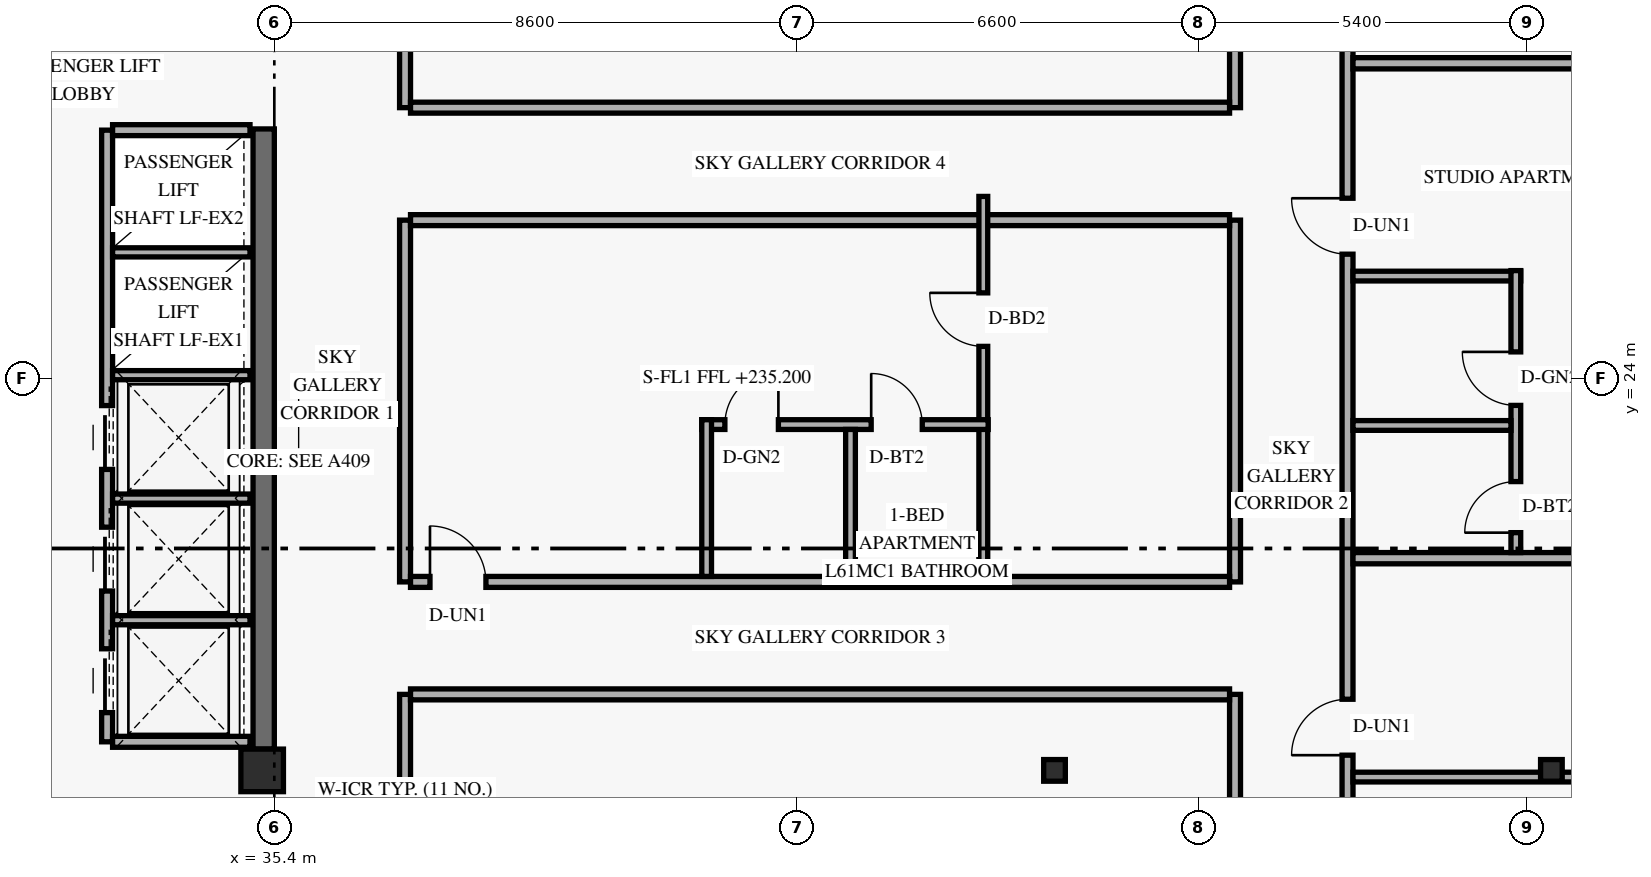
"""IFC4 building model, lengths in metres.
Left out: names, types, materials, properties, quantities, classifications, styles, units other than length and angle.
Written with IfcOpenShell. Run it as: python <this file> out.ifc"""

import sys

from ifc_helpers import new_model, si_unit, direction, frame, frame_2d, origin, origin_2d, place, context, subcontext, project, spatial, rectangle, hollow_rectangle, extrude, element, fill, save


model = new_model("IFC4")
c1 = context("Model", 3, precision=1e-05, world=origin(), true_north=direction((0.0, 1.0)))
c2 = subcontext(c1, "Body", "Model", "MODEL_VIEW")
j1 = project(units=[si_unit("LENGTHUNIT", "METRE"), si_unit("PLANEANGLEUNIT", "RADIAN")], contexts=[c1])
p1 = place(None, origin())
s1 = spatial("IfcSite", under=j1, at=p1, CompositionType="ELEMENT")
p2 = place(p1, origin())
s2 = spatial("IfcBuilding", under=s1, at=p2, CompositionType="ELEMENT")
p3 = place(p2, frame((0.0, 0.0, 235.2)))
s3 = spatial("IfcBuildingStorey", under=s2, at=p3, CompositionType="ELEMENT", Elevation=235.2)
p4 = place(p3, frame((35.225, 17.9, 0.0), z_axis=(0.0, 0.0, 1.0), x_axis=(0.0, 1.0, 0.0)))
e1 = element("IfcWall", 1, at=p4, inside=s3, PredefinedType="SHEAR", context=c2, shape_type="SweptSolid", body=[
    extrude(rectangle(XDim=10.2, YDim=0.35, at=frame_2d((5.1, 0.0))), origin(), (0.0, 0.0, 1.0), 2.821),
])
p5 = place(p3, frame((35.2, 17.55, 0.0), z_axis=(0.0, 0.0, 1.0), x_axis=(1.0, 0.0, 0.0)))
e2 = element("IfcColumn", 2, at=p5, inside=s3, PredefinedType="COLUMN", context=c2, shape_type="SweptSolid", body=[
    extrude(rectangle(XDim=0.7, YDim=0.7, at=origin_2d()), origin(), (0.0, 0.0, 1.0), 3.6),
])
p6 = place(p3, frame((48.168, 17.55, 0.0), z_axis=(0.034971136209, 0.0, 0.999388322742), x_axis=(0.0, 1.0, 0.0)))
e3 = element("IfcColumn", 3, at=p6, inside=s3, PredefinedType="COLUMN", context=c2, shape_type="SweptSolid", body=[
    extrude(hollow_rectangle(XDim=0.356, YDim=0.356, WallThickness=0.016, at=origin_2d()), origin(), (0.0, 0.0, 1.0), 3.602),
])
p7 = place(p3, frame((56.298, 17.55, 0.0), z_axis=(0.057884606321, 0.0, 0.998323280481), x_axis=(0.0, 1.0, 0.0)))
e4 = element("IfcColumn", 4, at=p7, inside=s3, PredefinedType="COLUMN", context=c2, shape_type="SweptSolid", body=[
    extrude(hollow_rectangle(XDim=0.356, YDim=0.356, WallThickness=0.016, at=origin_2d()), origin(), (0.0, 0.0, 1.0), 3.606),
])
p8 = place(p3, frame((32.65, 18.02, 0.0), z_axis=(0.0, 0.0, 1.0), x_axis=(0.0, 1.0, 0.0)))
e5 = element("IfcWall", 5, at=p8, inside=s3, PredefinedType="STANDARD", context=c2, shape_type="SweptSolid", body=[
    extrude(rectangle(XDim=10.06, YDim=0.18, at=frame_2d((5.03, 0.0))), origin(), (0.0, 0.0, 1.0), 3.36),
])
p9 = place(p8, frame((0.48, 0.0, 0.0)))
e6 = element("IfcOpeningElement", 6, at=p9, cuts=e5, PredefinedType="OPENING", context=c2, shape_type="SweptSolid", body=[
    extrude(rectangle(XDim=1.05, YDim=2.2, at=frame_2d((0.525, 1.1))), frame((0.0, 0.1, 0.0), z_axis=(0.0, -1.0, 0.0), x_axis=(1.0, 0.0, 0.0)), (0.0, 0.0, 1.0), 0.2),
])
p10 = place(p8, frame((2.48, 0.0, 0.0)))
e7 = element("IfcOpeningElement", 7, at=p10, cuts=e5, PredefinedType="OPENING", context=c2, shape_type="SweptSolid", body=[
    extrude(rectangle(XDim=1.05, YDim=2.2, at=frame_2d((0.525, 1.1))), frame((0.0, 0.1, 0.0), z_axis=(0.0, -1.0, 0.0), x_axis=(1.0, 0.0, 0.0)), (0.0, 0.0, 1.0), 0.2),
])
p11 = place(p8, frame((4.48, 0.0, 0.0)))
e8 = element("IfcOpeningElement", 8, at=p11, cuts=e5, PredefinedType="OPENING", context=c2, shape_type="SweptSolid", body=[
    extrude(rectangle(XDim=1.05, YDim=2.2, at=frame_2d((0.525, 1.1))), frame((0.0, 0.1, 0.0), z_axis=(0.0, -1.0, 0.0), x_axis=(1.0, 0.0, 0.0)), (0.0, 0.0, 1.0), 0.2),
])
for number, where, z_axis, x_axis in (
    (9, (32.74, 18.02, 0.0), (0.0, 0.0, 1.0), (1.0, 0.0, 0.0)),
    (10, (32.74, 28.08, 0.0), (0.0, 0.0, 1.0), (1.0, 0.0, 0.0)),
):
    element("IfcWall", number, at=place(p3, frame(where, z_axis=z_axis, x_axis=x_axis)), inside=s3, PredefinedType="STANDARD", context=c2, shape_type="SweptSolid", body=[
        extrude(rectangle(XDim=2.26, YDim=0.18, at=frame_2d((1.13, 0.0))), origin(), (0.0, 0.0, 1.0), 3.36),
    ])
for number, where, z_axis, x_axis in (
    (11, (32.74, 20.02, 0.0), (0.0, 0.0, 1.0), (1.0, 0.0, 0.0)),
    (12, (32.74, 22.02, 0.0), (0.0, 0.0, 1.0), (1.0, 0.0, 0.0)),
    (13, (32.74, 24.05, 0.0), (0.0, 0.0, 1.0), (1.0, 0.0, 0.0)),
    (14, (32.74, 26.07, 0.0), (0.0, 0.0, 1.0), (1.0, 0.0, 0.0)),
):
    element("IfcWall", number, at=place(p3, frame(where, z_axis=z_axis, x_axis=x_axis)), inside=s3, PredefinedType="STANDARD", context=c2, shape_type="SweptSolid", body=[
        extrude(rectangle(XDim=2.26, YDim=0.15, at=frame_2d((1.13, 0.0))), origin(), (0.0, 0.0, 1.0), 3.36),
    ])
p12 = place(p3, frame((37.55, 15.653, 0.0), z_axis=(0.0, 0.0, 1.0), x_axis=(0.0, 1.0, 0.0)))
e15 = element("IfcWall", 15, at=p12, inside=s3, PredefinedType="STANDARD", context=c2, shape_type="SweptSolid", body=[
    extrude(rectangle(XDim=3.147, YDim=0.18, at=frame_2d((1.574, 0.0))), origin(), (0.0, 0.0, 1.0), 2.803),
])
p13 = place(p3, frame((37.55, 20.65, 0.0), z_axis=(0.0, 0.0, 1.0), x_axis=(0.0, 1.0, 0.0)))
e16 = element("IfcWall", 16, at=p13, inside=s3, PredefinedType="STANDARD", context=c2, shape_type="SweptSolid", body=[
    extrude(rectangle(XDim=5.95, YDim=0.18, at=frame_2d((2.975, 0.0))), origin(), (0.0, 0.0, 1.0), 3.36),
])
p14 = place(p3, frame((37.55, 28.45, 0.0), z_axis=(0.0, 0.0, 1.0), x_axis=(0.0, 1.0, 0.0)))
e17 = element("IfcWall", 17, at=p14, inside=s3, PredefinedType="STANDARD", context=c2, shape_type="SweptSolid", body=[
    extrude(rectangle(XDim=2.828, YDim=0.18, at=frame_2d((1.414, 0.0))), origin(), (0.0, 0.0, 1.0), 2.803),
])
p15 = place(p3, frame((51.2, 5.77, 0.0), z_axis=(0.0, 0.0, 1.0), x_axis=(0.0, 1.0, 0.0)))
e18 = element("IfcWall", 18, at=p15, inside=s3, PredefinedType="STANDARD", context=c2, shape_type="SweptSolid", body=[
    extrude(rectangle(XDim=13.03, YDim=0.18, at=frame_2d((6.515, 0.0))), origin(), (0.0, 0.0, 1.0), 2.803),
])
p16 = place(p15, frame((3.87, 0.0, 0.0)))
e19 = element("IfcOpeningElement", 19, at=p16, cuts=e18, PredefinedType="OPENING", context=c2, shape_type="SweptSolid", body=[
    extrude(rectangle(XDim=0.92, YDim=2.15, at=frame_2d((0.46, 1.075))), frame((0.0, 0.1, 0.0), z_axis=(0.0, -1.0, 0.0), x_axis=(1.0, 0.0, 0.0)), (0.0, 0.0, 1.0), 0.2),
])
p17 = place(p3, frame((51.2, 20.65, 0.0), z_axis=(0.0, 0.0, 1.0), x_axis=(0.0, 1.0, 0.0)))
e20 = element("IfcWall", 20, at=p17, inside=s3, PredefinedType="STANDARD", context=c2, shape_type="SweptSolid", body=[
    extrude(rectangle(XDim=5.95, YDim=0.18, at=frame_2d((2.975, 0.0))), origin(), (0.0, 0.0, 1.0), 3.36),
])
p18 = place(p3, frame((51.2, 28.45, 0.0), z_axis=(0.0, 0.0, 1.0), x_axis=(0.0, 1.0, 0.0)))
e21 = element("IfcWall", 21, at=p18, inside=s3, PredefinedType="STANDARD", context=c2, shape_type="SweptSolid", body=[
    extrude(rectangle(XDim=13.78, YDim=0.18, at=frame_2d((6.89, 0.0))), origin(), (0.0, 0.0, 1.0), 2.803),
])
p19 = place(p18, frame((7.9, 0.0, 0.0)))
e22 = element("IfcOpeningElement", 22, at=p19, cuts=e21, PredefinedType="OPENING", context=c2, shape_type="SweptSolid", body=[
    extrude(rectangle(XDim=0.92, YDim=2.15, at=frame_2d((0.46, 1.075))), frame((0.0, 0.1, 0.0), z_axis=(0.0, -1.0, 0.0), x_axis=(1.0, 0.0, 0.0)), (0.0, 0.0, 1.0), 0.2),
])
p20 = place(p3, frame((37.64, 18.8, 0.0), z_axis=(0.0, 0.0, 1.0), x_axis=(1.0, 0.0, 0.0)))
e23 = element("IfcWall", 23, at=p20, inside=s3, PredefinedType="STANDARD", context=c2, shape_type="SweptSolid", body=[
    extrude(rectangle(XDim=13.47, YDim=0.18, at=frame_2d((6.735, 0.0))), origin(), (0.0, 0.0, 1.0), 2.803),
])
p21 = place(p3, frame((37.64, 20.65, 0.0), z_axis=(0.0, 0.0, 1.0), x_axis=(1.0, 0.0, 0.0)))
e24 = element("IfcWall", 24, at=p21, inside=s3, PredefinedType="STANDARD", context=c2, shape_type="SweptSolid", body=[
    extrude(rectangle(XDim=13.47, YDim=0.18, at=frame_2d((6.735, 0.0))), origin(), (0.0, 0.0, 1.0), 2.803),
])
p22 = place(p21, frame((0.32, 0.0, 0.0)))
e25 = element("IfcOpeningElement", 25, at=p22, cuts=e24, PredefinedType="OPENING", context=c2, shape_type="SweptSolid", body=[
    extrude(rectangle(XDim=0.92, YDim=2.15, at=frame_2d((0.46, 1.075))), frame((0.0, 0.1, 0.0), z_axis=(0.0, -1.0, 0.0), x_axis=(1.0, 0.0, 0.0)), (0.0, 0.0, 1.0), 0.2),
])
for number, where, z_axis, x_axis in (
    (26, (37.64, 26.6, 0.0), (0.0, 0.0, 1.0), (1.0, 0.0, 0.0)),
    (27, (37.64, 28.45, 0.0), (0.0, 0.0, 1.0), (1.0, 0.0, 0.0)),
):
    element("IfcWall", number, at=place(p3, frame(where, z_axis=z_axis, x_axis=x_axis)), inside=s3, PredefinedType="STANDARD", context=c2, shape_type="SweptSolid", body=[
        extrude(rectangle(XDim=13.47, YDim=0.18, at=frame_2d((6.735, 0.0))), origin(), (0.0, 0.0, 1.0), 2.803),
    ])
p23 = place(p3, frame((53.05, 5.77, 0.0), z_axis=(0.0, 0.0, 1.0), x_axis=(0.0, 1.0, 0.0)))
e28 = element("IfcWall", 28, at=p23, inside=s3, PredefinedType="STANDARD", context=c2, shape_type="SweptSolid", body=[
    extrude(rectangle(XDim=36.46, YDim=0.18, at=frame_2d((18.23, 0.0))), origin(), (0.0, 0.0, 1.0), 2.803),
])
p24 = place(p23, frame((1.357, 0.0, 0.0)))
e29 = element("IfcOpeningElement", 29, at=p24, cuts=e28, PredefinedType="OPENING", context=c2, shape_type="SweptSolid", body=[
    extrude(rectangle(XDim=0.92, YDim=2.15, at=frame_2d((0.46, 1.075))), frame((0.0, 0.1, 0.0), z_axis=(0.0, -1.0, 0.0), x_axis=(1.0, 0.0, 0.0)), (0.0, 0.0, 1.0), 0.2),
])
p25 = place(p23, frame((12.03, 0.0, 0.0)))
e30 = element("IfcOpeningElement", 30, at=p25, cuts=e28, PredefinedType="OPENING", context=c2, shape_type="SweptSolid", body=[
    extrude(rectangle(XDim=0.92, YDim=2.15, at=frame_2d((0.46, 1.075))), frame((0.0, 0.1, 0.0), z_axis=(0.0, -1.0, 0.0), x_axis=(1.0, 0.0, 0.0)), (0.0, 0.0, 1.0), 0.2),
])
p26 = place(p23, frame((20.27, 0.0, 0.0)))
e31 = element("IfcOpeningElement", 31, at=p26, cuts=e28, PredefinedType="OPENING", context=c2, shape_type="SweptSolid", body=[
    extrude(rectangle(XDim=0.92, YDim=2.15, at=frame_2d((0.46, 1.075))), frame((0.0, 0.1, 0.0), z_axis=(0.0, -1.0, 0.0), x_axis=(1.0, 0.0, 0.0)), (0.0, 0.0, 1.0), 0.2),
])
p27 = place(p23, frame((28.21, 0.0, 0.0)))
e32 = element("IfcOpeningElement", 32, at=p27, cuts=e28, PredefinedType="OPENING", context=c2, shape_type="SweptSolid", body=[
    extrude(rectangle(XDim=0.92, YDim=2.15, at=frame_2d((0.46, 1.075))), frame((0.0, 0.1, 0.0), z_axis=(0.0, -1.0, 0.0), x_axis=(1.0, 0.0, 0.0)), (0.0, 0.0, 1.0), 0.2),
])
p28 = place(p23, frame((35.21, 0.0, 0.0)))
e33 = element("IfcOpeningElement", 33, at=p28, cuts=e28, PredefinedType="OPENING", context=c2, shape_type="SweptSolid", body=[
    extrude(rectangle(XDim=0.92, YDim=2.15, at=frame_2d((0.46, 1.075))), frame((0.0, 0.1, 0.0), z_axis=(0.0, -1.0, 0.0), x_axis=(1.0, 0.0, 0.0)), (0.0, 0.0, 1.0), 0.2),
])
p29 = place(p3, frame((53.14, 17.44, 0.0), z_axis=(0.0, 0.0, 1.0), x_axis=(1.0, 0.0, 0.0)))
e34 = element("IfcWall", 34, at=p29, inside=s3, PredefinedType="PLUMBINGWALL", context=c2, shape_type="SweptSolid", body=[
    extrude(rectangle(XDim=5.53, YDim=0.16, at=frame_2d((2.765, 0.0))), origin(), (0.0, 0.0, 1.0), 2.803),
])
p30 = place(p3, frame((53.14, 21.04, 0.0), z_axis=(0.0, 0.0, 1.0), x_axis=(1.0, 0.0, 0.0)))
e35 = element("IfcWall", 35, at=p30, inside=s3, PredefinedType="PARTITIONING", context=c2, shape_type="SweptSolid", body=[
    extrude(rectangle(XDim=8.99, YDim=0.185, at=frame_2d((4.495, 0.0))), origin(), (0.0, 0.0, 1.0), 2.879),
])
p31 = place(p3, frame((53.14, 25.68, 0.0), z_axis=(0.0, 0.0, 1.0), x_axis=(1.0, 0.0, 0.0)))
e36 = element("IfcWall", 36, at=p31, inside=s3, PredefinedType="PLUMBINGWALL", context=c2, shape_type="SweptSolid", body=[
    extrude(rectangle(XDim=2.758, YDim=0.16, at=frame_2d((1.379, 0.0))), origin(), (0.0, 0.0, 1.0), 3.36),
])
p32 = place(p3, frame((55.818, 21.133, 0.0), z_axis=(0.0, 0.0, 1.0), x_axis=(0.0, 1.0, 0.0)))
e37 = element("IfcWall", 37, at=p32, inside=s3, PredefinedType="PLUMBINGWALL", context=c2, shape_type="SweptSolid", body=[
    extrude(rectangle(XDim=4.637, YDim=0.16, at=frame_2d((2.319, 0.0))), origin(), (0.0, 0.0, 1.0), 3.36),
])
p33 = place(p32, frame((0.327, 0.0, 0.0)))
e38 = element("IfcOpeningElement", 38, at=p33, cuts=e37, PredefinedType="OPENING", context=c2, shape_type="SweptSolid", body=[
    extrude(rectangle(XDim=0.84, YDim=2.12, at=frame_2d((0.42, 1.06))), frame((0.0, 0.09, 0.0), z_axis=(0.0, -1.0, 0.0), x_axis=(1.0, 0.0, 0.0)), (0.0, 0.0, 1.0), 0.18),
])
p34 = place(p32, frame((2.42, 0.0, 0.0)))
e39 = element("IfcOpeningElement", 39, at=p34, cuts=e37, PredefinedType="OPENING", context=c2, shape_type="SweptSolid", body=[
    extrude(rectangle(XDim=0.88, YDim=2.12, at=frame_2d((0.44, 1.06))), frame((0.0, 0.09, 0.0), z_axis=(0.0, -1.0, 0.0), x_axis=(1.0, 0.0, 0.0)), (0.0, 0.0, 1.0), 0.18),
])
p35 = place(p3, frame((53.14, 23.223, 0.0), z_axis=(0.0, 0.0, 1.0), x_axis=(1.0, 0.0, 0.0)))
e40 = element("IfcWall", 40, at=p35, inside=s3, PredefinedType="PLUMBINGWALL", context=c2, shape_type="SweptSolid", body=[
    extrude(rectangle(XDim=2.598, YDim=0.16, at=frame_2d((1.299, 0.0))), origin(), (0.0, 0.0, 1.0), 3.36),
])
p36 = place(p3, frame((53.14, 29.18, 0.0), z_axis=(0.0, 0.0, 1.0), x_axis=(1.0, 0.0, 0.0)))
e41 = element("IfcWall", 41, at=p36, inside=s3, PredefinedType="PARTITIONING", context=c2, shape_type="SweptSolid", body=[
    extrude(rectangle(XDim=8.99, YDim=0.185, at=frame_2d((4.495, 0.0))), origin(), (0.0, 0.0, 1.0), 2.879),
])
p37 = place(p3, frame((47.06, 20.74, 0.0), z_axis=(0.0, 0.0, 1.0), x_axis=(0.0, 1.0, 0.0)))
e42 = element("IfcWall", 42, at=p37, inside=s3, PredefinedType="PARTITIONING", context=c2, shape_type="SweptSolid", body=[
    extrude(rectangle(XDim=6.25, YDim=0.145, at=frame_2d((3.125, 0.0))), origin(), (0.0, 0.0, 1.0), 3.36),
])
p38 = place(p37, frame((3.784, 0.0, 0.0)))
e43 = element("IfcOpeningElement", 43, at=p38, cuts=e42, PredefinedType="OPENING", context=c2, shape_type="SweptSolid", body=[
    extrude(rectangle(XDim=0.88, YDim=2.14, at=frame_2d((0.44, 1.07))), frame((0.0, 0.083, 0.0), z_axis=(0.0, -1.0, 0.0), x_axis=(1.0, 0.0, 0.0)), (0.0, 0.0, 1.0), 0.165),
])
p39 = place(p3, frame((42.43, 23.238, 0.0), z_axis=(0.0, 0.0, 1.0), x_axis=(1.0, 0.0, 0.0)))
e44 = element("IfcWall", 44, at=p39, inside=s3, PredefinedType="PLUMBINGWALL", context=c2, shape_type="SweptSolid", body=[
    extrude(rectangle(XDim=4.71, YDim=0.16, at=frame_2d((2.355, 0.0))), origin(), (0.0, 0.0, 1.0), 3.36),
])
p40 = place(p39, frame((0.38, 0.0, 0.0)))
e45 = element("IfcOpeningElement", 45, at=p40, cuts=e44, PredefinedType="OPENING", context=c2, shape_type="SweptSolid", body=[
    extrude(rectangle(XDim=0.88, YDim=2.12, at=frame_2d((0.44, 1.06))), frame((0.0, 0.09, 0.0), z_axis=(0.0, -1.0, 0.0), x_axis=(1.0, 0.0, 0.0)), (0.0, 0.0, 1.0), 0.18),
])
p41 = place(p39, frame((2.786, 0.0, 0.0)))
e46 = element("IfcOpeningElement", 46, at=p41, cuts=e44, PredefinedType="OPENING", context=c2, shape_type="SweptSolid", body=[
    extrude(rectangle(XDim=0.84, YDim=2.12, at=frame_2d((0.42, 1.06))), frame((0.0, 0.09, 0.0), z_axis=(0.0, -1.0, 0.0), x_axis=(1.0, 0.0, 0.0)), (0.0, 0.0, 1.0), 0.18),
])
p42 = place(p3, frame((42.51, 20.74, 0.0), z_axis=(0.0, 0.0, 1.0), x_axis=(0.0, 1.0, 0.0)))
e47 = element("IfcWall", 47, at=p42, inside=s3, PredefinedType="PLUMBINGWALL", context=c2, shape_type="SweptSolid", body=[
    extrude(rectangle(XDim=2.577, YDim=0.16, at=frame_2d((1.289, 0.0))), origin(), (0.0, 0.0, 1.0), 3.36),
])
p43 = place(p3, frame((44.876, 20.74, 0.0), z_axis=(0.0, 0.0, 1.0), x_axis=(0.0, 1.0, 0.0)))
e48 = element("IfcWall", 48, at=p43, inside=s3, PredefinedType="PLUMBINGWALL", context=c2, shape_type="SweptSolid", body=[
    extrude(rectangle(XDim=2.417, YDim=0.16, at=frame_2d((1.209, 0.0))), origin(), (0.0, 0.0, 1.0), 3.36),
])
p44 = place(p9, origin())
e49 = element("IfcDoor", 49, at=p44, inside=s3, OperationType="SLIDING_TO_LEFT", PredefinedType="DOOR", context=c2, shape_type="SweptSolid", body=[
    extrude(rectangle(XDim=1.05, YDim=2.2, at=frame_2d((0.525, 1.1))), frame((0.0, 0.025, 0.0), z_axis=(0.0, -1.0, 0.0), x_axis=(1.0, 0.0, 0.0)), (0.0, 0.0, 1.0), 0.05),
])
fill(e6, e49)
p45 = place(p10, origin())
e50 = element("IfcDoor", 50, at=p45, inside=s3, OperationType="SLIDING_TO_LEFT", PredefinedType="DOOR", context=c2, shape_type="SweptSolid", body=[
    extrude(rectangle(XDim=1.05, YDim=2.2, at=frame_2d((0.525, 1.1))), frame((0.0, 0.025, 0.0), z_axis=(0.0, -1.0, 0.0), x_axis=(1.0, 0.0, 0.0)), (0.0, 0.0, 1.0), 0.05),
])
fill(e7, e50)
p46 = place(p11, origin())
e51 = element("IfcDoor", 51, at=p46, inside=s3, OperationType="SLIDING_TO_LEFT", PredefinedType="DOOR", context=c2, shape_type="SweptSolid", body=[
    extrude(rectangle(XDim=1.05, YDim=2.2, at=frame_2d((0.525, 1.1))), frame((0.0, 0.025, 0.0), z_axis=(0.0, -1.0, 0.0), x_axis=(1.0, 0.0, 0.0)), (0.0, 0.0, 1.0), 0.05),
])
fill(e8, e51)
p47 = place(p25, origin())
e52 = element("IfcDoor", 52, at=p47, inside=s3, OperationType="SINGLE_SWING_LEFT", PredefinedType="DOOR", context=c2, shape_type="SweptSolid", body=[
    extrude(rectangle(XDim=0.92, YDim=2.15, at=frame_2d((0.46, 1.075))), frame((0.0, 0.025, 0.0), z_axis=(0.0, -1.0, 0.0), x_axis=(1.0, 0.0, 0.0)), (0.0, 0.0, 1.0), 0.05),
])
fill(e30, e52)
p48 = place(p26, origin())
e53 = element("IfcDoor", 53, at=p48, inside=s3, OperationType="SINGLE_SWING_RIGHT", PredefinedType="DOOR", context=c2, shape_type="SweptSolid", body=[
    extrude(rectangle(XDim=0.92, YDim=2.15, at=frame_2d((0.46, 1.075))), frame((0.0, 0.025, 0.0), z_axis=(0.0, -1.0, 0.0), x_axis=(1.0, 0.0, 0.0)), (0.0, 0.0, 1.0), 0.05),
])
fill(e31, e53)
p49 = place(p33, origin())
e54 = element("IfcDoor", 54, at=p49, inside=s3, OperationType="SINGLE_SWING_LEFT", PredefinedType="DOOR", context=c2, shape_type="SweptSolid", body=[
    extrude(rectangle(XDim=0.84, YDim=2.12, at=frame_2d((0.42, 1.06))), frame((0.0, 0.025, 0.0), z_axis=(0.0, -1.0, 0.0), x_axis=(1.0, 0.0, 0.0)), (0.0, 0.0, 1.0), 0.05),
])
fill(e38, e54)
p50 = place(p34, origin())
e55 = element("IfcDoor", 55, at=p50, inside=s3, OperationType="SINGLE_SWING_RIGHT", PredefinedType="DOOR", context=c2, shape_type="SweptSolid", body=[
    extrude(rectangle(XDim=0.88, YDim=2.12, at=frame_2d((0.44, 1.06))), frame((0.0, 0.025, 0.0), z_axis=(0.0, -1.0, 0.0), x_axis=(1.0, 0.0, 0.0)), (0.0, 0.0, 1.0), 0.05),
])
fill(e39, e55)
p51 = place(p22, origin())
e56 = element("IfcDoor", 56, at=p51, inside=s3, OperationType="SINGLE_SWING_LEFT", PredefinedType="DOOR", context=c2, shape_type="SweptSolid", body=[
    extrude(rectangle(XDim=0.92, YDim=2.15, at=frame_2d((0.46, 1.075))), frame((0.0, 0.025, 0.0), z_axis=(0.0, -1.0, 0.0), x_axis=(1.0, 0.0, 0.0)), (0.0, 0.0, 1.0), 0.05),
])
fill(e25, e56)
p52 = place(p40, origin())
e57 = element("IfcDoor", 57, at=p52, inside=s3, OperationType="SINGLE_SWING_RIGHT", PredefinedType="DOOR", context=c2, shape_type="SweptSolid", body=[
    extrude(rectangle(XDim=0.88, YDim=2.12, at=frame_2d((0.44, 1.06))), frame((0.0, 0.025, 0.0), z_axis=(0.0, -1.0, 0.0), x_axis=(1.0, 0.0, 0.0)), (0.0, 0.0, 1.0), 0.05),
])
fill(e45, e57)
p53 = place(p41, origin())
e58 = element("IfcDoor", 58, at=p53, inside=s3, OperationType="SINGLE_SWING_LEFT", PredefinedType="DOOR", context=c2, shape_type="SweptSolid", body=[
    extrude(rectangle(XDim=0.84, YDim=2.12, at=frame_2d((0.42, 1.06))), frame((0.0, 0.025, 0.0), z_axis=(0.0, -1.0, 0.0), x_axis=(1.0, 0.0, 0.0)), (0.0, 0.0, 1.0), 0.05),
])
fill(e46, e58)
p54 = place(p38, origin())
e59 = element("IfcDoor", 59, at=p54, inside=s3, OperationType="SINGLE_SWING_RIGHT", PredefinedType="DOOR", context=c2, shape_type="SweptSolid", body=[
    extrude(rectangle(XDim=0.88, YDim=2.14, at=frame_2d((0.44, 1.07))), frame((0.0, 0.025, 0.0), z_axis=(0.0, -1.0, 0.0), x_axis=(1.0, 0.0, 0.0)), (0.0, 0.0, 1.0), 0.05),
])
fill(e43, e59)
save(model, sys.argv[1])
